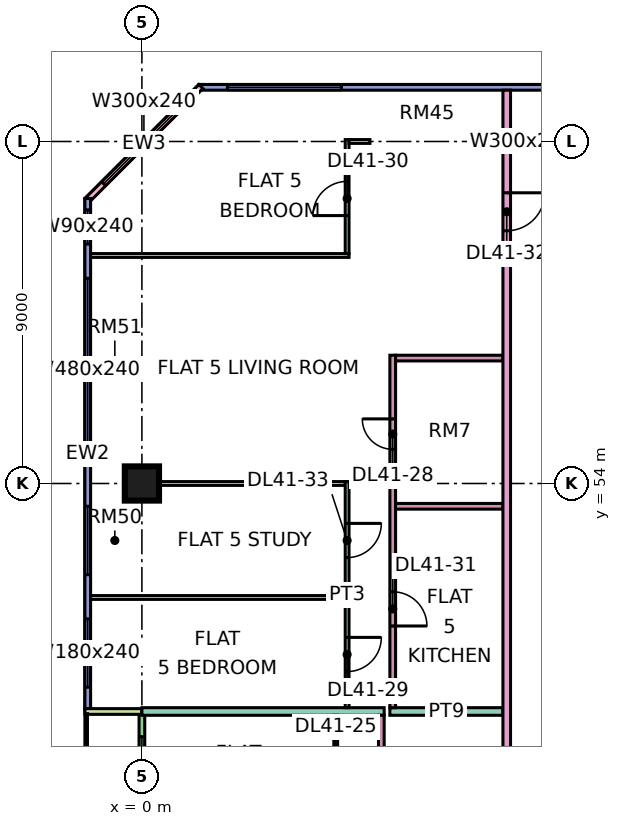
"""IFC4 building model, lengths in metres.
Left out: names, types, materials, properties, quantities, classifications, styles, units other than length and angle.
Written with IfcOpenShell. Run it as: python <this file> out.ifc"""

import sys

from ifc_helpers import new_model, si_unit, direction, frame, frame_2d, origin, origin_2d, place, context, subcontext, project, spatial, rectangle, extrude, element, fill, save


model = new_model("IFC4")
c1 = context("Model", 3, precision=1e-05, world=origin(), true_north=direction((0.0, 1.0)))
c2 = subcontext(c1, "Body", "Model", "MODEL_VIEW")
j1 = project(units=[si_unit("LENGTHUNIT", "METRE"), si_unit("PLANEANGLEUNIT", "RADIAN")], contexts=[c1])
p1 = place(None, origin())
s1 = spatial("IfcSite", under=j1, at=p1, CompositionType="ELEMENT")
p2 = place(p1, origin())
s2 = spatial("IfcBuilding", under=s1, at=p2, CompositionType="ELEMENT")
p3 = place(p2, frame((0.0, 0.0, 179.9)))
s3 = spatial("IfcBuildingStorey", under=s2, at=p3, CompositionType="ELEMENT", Elevation=179.9)
p4 = place(p3, frame((0.0, 54.0, 0.0), z_axis=(0.0, 0.0, 1.0), x_axis=(1.0, 0.0, 0.0)))
e1 = element("IfcColumn", 1, at=p4, inside=s3, PredefinedType="COLUMN", context=c2, shape_type="SweptSolid", body=[
    extrude(rectangle(XDim=0.9, YDim=0.9, at=origin_2d()), origin(), (0.0, 0.0, 1.0), 3.75),
])
p5 = place(p3, frame((11.925, 64.425, 0.0), z_axis=(0.0, 0.0, 1.0), x_axis=(-1.0, 0.0, 0.0)))
e2 = element("IfcWall", 2, at=p5, inside=s3, PredefinedType="SOLIDWALL", context=c2, shape_type="SweptSolid", body=[
    extrude(rectangle(XDim=10.425, YDim=0.15, at=frame_2d((5.212, 0.0))), origin(), (0.0, 0.0, 1.0), 3.35),
])
p6 = place(p5, frame((6.675, 0.0, 0.45)))
e3 = element("IfcOpeningElement", 3, at=p6, cuts=e2, PredefinedType="OPENING", context=c2, shape_type="SweptSolid", body=[
    extrude(rectangle(XDim=3.0, YDim=2.4, at=frame_2d((1.5, 1.2))), frame((0.0, 0.085, 0.0), z_axis=(0.0, -1.0, 0.0), x_axis=(1.0, 0.0, 0.0)), (0.0, 0.0, 1.0), 0.17),
])
p7 = place(p3, frame((1.553, 64.447, 0.0), z_axis=(0.0, 0.0, 1.0), x_axis=(-0.707106781187, -0.707106781187, 0.0)))
e4 = element("IfcWall", 4, at=p7, inside=s3, PredefinedType="SOLIDWALL", context=c2, shape_type="SweptSolid", body=[
    extrude(rectangle(XDim=4.243, YDim=0.15, at=frame_2d((2.121, 0.0))), origin(), (0.0, 0.0, 1.0), 3.35),
])
p8 = place(p7, frame((0.621, 0.0, 0.45)))
e5 = element("IfcOpeningElement", 5, at=p8, cuts=e4, PredefinedType="OPENING", context=c2, shape_type="SweptSolid", body=[
    extrude(rectangle(XDim=3.0, YDim=2.4, at=frame_2d((1.5, 1.2))), frame((0.0, 0.085, 0.0), z_axis=(0.0, -1.0, 0.0), x_axis=(1.0, 0.0, 0.0)), (0.0, 0.0, 1.0), 0.17),
])
p9 = place(p3, frame((-1.425, 61.5, 0.0), z_axis=(0.0, 0.0, 1.0), x_axis=(0.0, -1.0, 0.0)))
e6 = element("IfcWall", 6, at=p9, inside=s3, PredefinedType="SOLIDWALL", context=c2, shape_type="SweptSolid", body=[
    extrude(rectangle(XDim=13.425, YDim=0.15, at=frame_2d((6.712, 0.0))), origin(), (0.0, 0.0, 1.0), 3.35),
])
p10 = place(p9, frame((0.3, 0.0, 0.45)))
e7 = element("IfcOpeningElement", 7, at=p10, cuts=e6, PredefinedType="OPENING", context=c2, shape_type="SweptSolid", body=[
    extrude(rectangle(XDim=0.9, YDim=2.4, at=frame_2d((0.45, 1.2))), frame((0.0, 0.085, 0.0), z_axis=(0.0, -1.0, 0.0), x_axis=(1.0, 0.0, 0.0)), (0.0, 0.0, 1.0), 0.17),
])
p11 = place(p9, frame((2.1, 0.0, 0.45)))
e8 = element("IfcOpeningElement", 8, at=p11, cuts=e6, PredefinedType="OPENING", context=c2, shape_type="SweptSolid", body=[
    extrude(rectangle(XDim=4.8, YDim=2.4, at=frame_2d((2.4, 1.2))), frame((0.0, 0.085, 0.0), z_axis=(0.0, -1.0, 0.0), x_axis=(1.0, 0.0, 0.0)), (0.0, 0.0, 1.0), 0.17),
])
p12 = place(p9, frame((8.1, 0.0, 0.45)))
e9 = element("IfcOpeningElement", 9, at=p12, cuts=e6, PredefinedType="OPENING", context=c2, shape_type="SweptSolid", body=[
    extrude(rectangle(XDim=1.8, YDim=2.4, at=frame_2d((0.9, 1.2))), frame((0.0, 0.085, 0.0), z_axis=(0.0, -1.0, 0.0), x_axis=(1.0, 0.0, 0.0)), (0.0, 0.0, 1.0), 0.17),
])
p13 = place(p9, frame((11.062, 0.0, 0.45)))
e10 = element("IfcOpeningElement", 10, at=p13, cuts=e6, PredefinedType="OPENING", context=c2, shape_type="SweptSolid", body=[
    extrude(rectangle(XDim=1.8, YDim=2.4, at=frame_2d((0.9, 1.2))), frame((0.0, 0.085, 0.0), z_axis=(0.0, -1.0, 0.0), x_axis=(1.0, 0.0, 0.0)), (0.0, 0.0, 1.0), 0.17),
])
p14 = place(p3, frame((0.0, 47.925, 0.0), z_axis=(0.0, 0.0, 1.0), x_axis=(0.0, -1.0, 0.0)))
e11 = element("IfcWall", 11, at=p14, inside=s3, PredefinedType="SOLIDWALL", context=c2, shape_type="SweptSolid", body=[
    extrude(rectangle(XDim=11.85, YDim=0.15, at=frame_2d((5.925, 0.0))), origin(), (0.0, 0.0, 1.0), 3.35),
])
p15 = place(p14, frame((0.587, 0.0, 0.45)))
e12 = element("IfcOpeningElement", 12, at=p15, cuts=e11, PredefinedType="OPENING", context=c2, shape_type="SweptSolid", body=[
    extrude(rectangle(XDim=1.2, YDim=2.4, at=frame_2d((0.6, 1.2))), frame((0.0, 0.085, 0.0), z_axis=(0.0, -1.0, 0.0), x_axis=(1.0, 0.0, 0.0)), (0.0, 0.0, 1.0), 0.17),
])
p16 = place(p14, frame((5.3, 0.0, 0.0)))
e13 = element("IfcOpeningElement", 13, at=p16, cuts=e11, PredefinedType="OPENING", context=c2, shape_type="SweptSolid", body=[
    extrude(rectangle(XDim=1.8, YDim=2.4, at=frame_2d((0.9, 1.2))), frame((0.0, 0.085, 0.0), z_axis=(0.0, -1.0, 0.0), x_axis=(1.0, 0.0, 0.0)), (0.0, 0.0, 1.0), 0.17),
])
p17 = place(p14, frame((9.55, 0.0, 0.45)))
e14 = element("IfcOpeningElement", 14, at=p17, cuts=e11, PredefinedType="OPENING", context=c2, shape_type="SweptSolid", body=[
    extrude(rectangle(XDim=1.2, YDim=2.4, at=frame_2d((0.6, 1.2))), frame((0.0, 0.085, 0.0), z_axis=(0.0, -1.0, 0.0), x_axis=(1.0, 0.0, 0.0)), (0.0, 0.0, 1.0), 0.17),
])
p18 = place(p3, frame((-1.5, 48.0, 0.0), z_axis=(0.0, 0.0, 1.0), x_axis=(1.0, 0.0, 0.0)))
e15 = element("IfcWall", 15, at=p18, inside=s3, PredefinedType="SOLIDWALL", context=c2, shape_type="SweptSolid", body=[
    extrude(rectangle(XDim=1.5, YDim=0.15, at=frame_2d((0.75, 0.0))), origin(), (0.0, 0.0, 1.0), 3.35),
])
p19 = place(p3, frame((0.0, 48.0, 0.0), z_axis=(0.0, 0.0, 1.0), x_axis=(1.0, 0.0, 0.0)))
e16 = element("IfcWall", 16, at=p19, inside=s3, PredefinedType="PARTITIONING", context=c2, shape_type="SweptSolid", body=[
    extrude(rectangle(XDim=6.375, YDim=0.2, at=frame_2d((3.188, 0.0))), origin(), (0.0, 0.0, 1.0), 3.35),
])
p20 = place(p3, frame((-1.35, 51.0, 0.0), z_axis=(0.0, 0.0, 1.0), x_axis=(1.0, 0.0, 0.0)))
e17 = element("IfcWall", 17, at=p20, inside=s3, PredefinedType="PARTITIONING", context=c2, shape_type="SweptSolid", body=[
    extrude(rectangle(XDim=6.7, YDim=0.1, at=frame_2d((3.35, 0.0))), origin(), (0.0, 0.0, 1.0), 3.35),
])
e18 = element("IfcWall", 18, at=p4, inside=s3, PredefinedType="PARTITIONING", context=c2, shape_type="SweptSolid", body=[
    extrude(rectangle(XDim=5.35, YDim=0.1, at=frame_2d((2.675, 0.0))), origin(), (0.0, 0.0, 1.0), 3.35),
])
p21 = place(p3, frame((-1.35, 60.0, 0.0), z_axis=(0.0, 0.0, 1.0), x_axis=(1.0, 0.0, 0.0)))
e19 = element("IfcWall", 19, at=p21, inside=s3, PredefinedType="PARTITIONING", context=c2, shape_type="SweptSolid", body=[
    extrude(rectangle(XDim=6.8, YDim=0.1, at=frame_2d((3.4, 0.0))), origin(), (0.0, 0.0, 1.0), 3.35),
])
p22 = place(p3, frame((5.1, 45.05, 0.0), z_axis=(0.0, 0.0, 1.0), x_axis=(0.0, 1.0, 0.0)))
e20 = element("IfcWall", 20, at=p22, inside=s3, PredefinedType="PARTITIONING", context=c2, shape_type="SweptSolid", body=[
    extrude(rectangle(XDim=2.85, YDim=0.1, at=frame_2d((1.425, 0.0))), origin(), (0.0, 0.0, 1.0), 3.35),
])
p23 = place(p22, frame((1.0, 0.0, 0.0)))
e21 = element("IfcOpeningElement", 21, at=p23, cuts=e20, PredefinedType="OPENING", context=c2, shape_type="SweptSolid", body=[
    extrude(rectangle(XDim=0.9, YDim=2.1, at=frame_2d((0.45, 1.05))), frame((0.0, 0.06, 0.0), z_axis=(0.0, -1.0, 0.0), x_axis=(1.0, 0.0, 0.0)), (0.0, 0.0, 1.0), 0.12),
])
p24 = place(p3, frame((5.4, 48.1, 0.0), z_axis=(0.0, 0.0, 1.0), x_axis=(0.0, 1.0, 0.0)))
e22 = element("IfcWall", 22, at=p24, inside=s3, PredefinedType="PARTITIONING", context=c2, shape_type="SweptSolid", body=[
    extrude(rectangle(XDim=5.95, YDim=0.1, at=frame_2d((2.975, 0.0))), origin(), (0.0, 0.0, 1.0), 3.35),
])
p25 = place(p24, frame((0.95, 0.0, 0.0)))
e23 = element("IfcOpeningElement", 23, at=p25, cuts=e22, PredefinedType="OPENING", context=c2, shape_type="SweptSolid", body=[
    extrude(rectangle(XDim=0.9, YDim=2.1, at=frame_2d((0.45, 1.05))), frame((0.0, 0.06, 0.0), z_axis=(0.0, -1.0, 0.0), x_axis=(1.0, 0.0, 0.0)), (0.0, 0.0, 1.0), 0.12),
])
p26 = place(p24, frame((3.95, 0.0, 0.0)))
e24 = element("IfcOpeningElement", 24, at=p26, cuts=e22, PredefinedType="OPENING", context=c2, shape_type="SweptSolid", body=[
    extrude(rectangle(XDim=0.9, YDim=2.1, at=frame_2d((0.45, 1.05))), frame((0.0, 0.06, 0.0), z_axis=(0.0, -1.0, 0.0), x_axis=(1.0, 0.0, 0.0)), (0.0, 0.0, 1.0), 0.12),
])
p27 = place(p3, frame((5.4, 60.05, 0.0), z_axis=(0.0, 0.0, 1.0), x_axis=(0.0, 1.0, 0.0)))
e25 = element("IfcWall", 25, at=p27, inside=s3, PredefinedType="PARTITIONING", context=c2, shape_type="SweptSolid", body=[
    extrude(rectangle(XDim=3.0, YDim=0.1, at=frame_2d((1.5, 0.0))), origin(), (0.0, 0.0, 1.0), 3.35),
])
p28 = place(p27, frame((1.0, 0.0, 0.0)))
e26 = element("IfcOpeningElement", 26, at=p28, cuts=e25, PredefinedType="OPENING", context=c2, shape_type="SweptSolid", body=[
    extrude(rectangle(XDim=0.9, YDim=2.1, at=frame_2d((0.45, 1.05))), frame((0.0, 0.06, 0.0), z_axis=(0.0, -1.0, 0.0), x_axis=(1.0, 0.0, 0.0)), (0.0, 0.0, 1.0), 0.12),
])
p29 = place(p3, frame((5.45, 63.0, 0.0), z_axis=(0.0, 0.0, 1.0), x_axis=(1.0, 0.0, 0.0)))
e27 = element("IfcWall", 27, at=p29, inside=s3, PredefinedType="PARTITIONING", context=c2, shape_type="SweptSolid", body=[
    extrude(rectangle(XDim=0.55, YDim=0.1, at=frame_2d((0.275, 0.0))), origin(), (0.0, 0.0, 1.0), 3.35),
])
p30 = place(p3, frame((6.3, 38.625, 0.0), z_axis=(0.0, 0.0, 1.0), x_axis=(0.0, 1.0, 0.0)))
e28 = element("IfcWall", 28, at=p30, inside=s3, PredefinedType="PARTITIONING", context=c2, shape_type="SweptSolid", body=[
    extrude(rectangle(XDim=9.275, YDim=0.15, at=frame_2d((4.637, 0.0))), origin(), (0.0, 0.0, 1.0), 3.35),
])
p31 = place(p30, frame((1.125, 0.0, 0.0)))
e29 = element("IfcOpeningElement", 29, at=p31, cuts=e28, PredefinedType="OPENING", context=c2, shape_type="SweptSolid", body=[
    extrude(rectangle(XDim=0.8, YDim=2.1, at=frame_2d((0.4, 1.05))), frame((0.0, 0.085, 0.0), z_axis=(0.0, -1.0, 0.0), x_axis=(1.0, 0.0, 0.0)), (0.0, 0.0, 1.0), 0.17),
])
p32 = place(p30, frame((5.775, 0.0, 0.0)))
e30 = element("IfcOpeningElement", 30, at=p32, cuts=e28, PredefinedType="OPENING", context=c2, shape_type="SweptSolid", body=[
    extrude(rectangle(XDim=0.9, YDim=2.1, at=frame_2d((0.45, 1.05))), frame((0.0, 0.085, 0.0), z_axis=(0.0, -1.0, 0.0), x_axis=(1.0, 0.0, 0.0)), (0.0, 0.0, 1.0), 0.17),
])
p33 = place(p3, frame((6.525, 48.0, 0.0), z_axis=(0.0, 0.0, 1.0), x_axis=(1.0, 0.0, 0.0)))
e31 = element("IfcWall", 31, at=p33, inside=s3, PredefinedType="PARTITIONING", context=c2, shape_type="SweptSolid", body=[
    extrude(rectangle(XDim=2.975, YDim=0.2, at=frame_2d((1.488, 0.0))), origin(), (0.0, 0.0, 1.0), 3.35),
])
p34 = place(p3, frame((6.6, 48.1, 0.0), z_axis=(0.0, 0.0, 1.0), x_axis=(0.0, 1.0, 0.0)))
e32 = element("IfcWall", 32, at=p34, inside=s3, PredefinedType="PARTITIONING", context=c2, shape_type="SweptSolid", body=[
    extrude(rectangle(XDim=9.275, YDim=0.15, at=frame_2d((4.637, 0.0))), origin(), (0.0, 0.0, 1.0), 3.35),
])
p35 = place(p34, frame((6.8, 0.0, 0.0)))
e33 = element("IfcOpeningElement", 33, at=p35, cuts=e32, PredefinedType="OPENING", context=c2, shape_type="SweptSolid", body=[
    extrude(rectangle(XDim=0.8, YDim=2.1, at=frame_2d((0.4, 1.05))), frame((0.0, 0.085, 0.0), z_axis=(0.0, -1.0, 0.0), x_axis=(1.0, 0.0, 0.0)), (0.0, 0.0, 1.0), 0.17),
])
p36 = place(p34, frame((2.15, 0.0, 0.0)))
e34 = element("IfcOpeningElement", 34, at=p36, cuts=e32, PredefinedType="OPENING", context=c2, shape_type="SweptSolid", body=[
    extrude(rectangle(XDim=0.9, YDim=2.1, at=frame_2d((0.45, 1.05))), frame((0.0, 0.085, 0.0), z_axis=(0.0, -1.0, 0.0), x_axis=(1.0, 0.0, 0.0)), (0.0, 0.0, 1.0), 0.17),
])
for number, where, z_axis, x_axis in (
    (35, (6.675, 53.4, 0.0), (0.0, 0.0, 1.0), (1.0, 0.0, 0.0)),
    (36, (6.675, 57.3, 0.0), (0.0, 0.0, 1.0), (1.0, 0.0, 0.0)),
):
    element("IfcWall", number, at=place(p3, frame(where, z_axis=z_axis, x_axis=x_axis)), inside=s3, PredefinedType="PARTITIONING", context=c2, shape_type="SweptSolid", body=[
        extrude(rectangle(XDim=2.825, YDim=0.15, at=frame_2d((1.413, 0.0))), origin(), (0.0, 0.0, 1.0), 3.35),
    ])
p37 = place(p3, frame((9.6, 20.0, 0.0), z_axis=(0.0, 0.0, 1.0), x_axis=(0.0, 1.0, 0.0)))
e37 = element("IfcWall", 37, at=p37, inside=s3, PredefinedType="PARTITIONING", context=c2, shape_type="SweptSolid", body=[
    extrude(rectangle(XDim=44.35, YDim=0.2, at=frame_2d((22.175, 0.0))), origin(), (0.0, 0.0, 1.0), 3.35),
])
p38 = place(p37, frame((16.8, 0.0, 0.0)))
e38 = element("IfcOpeningElement", 38, at=p38, cuts=e37, PredefinedType="OPENING", context=c2, shape_type="SweptSolid", body=[
    extrude(rectangle(XDim=1.0, YDim=2.1, at=frame_2d((0.5, 1.05))), frame((0.0, 0.11, 0.0), z_axis=(0.0, -1.0, 0.0), x_axis=(1.0, 0.0, 0.0)), (0.0, 0.0, 1.0), 0.22),
])
p39 = place(p37, frame((40.65, 0.0, 0.0)))
e39 = element("IfcOpeningElement", 39, at=p39, cuts=e37, PredefinedType="OPENING", context=c2, shape_type="SweptSolid", body=[
    extrude(rectangle(XDim=1.0, YDim=2.1, at=frame_2d((0.5, 1.05))), frame((0.0, 0.11, 0.0), z_axis=(0.0, -1.0, 0.0), x_axis=(1.0, 0.0, 0.0)), (0.0, 0.0, 1.0), 0.22),
])
p40 = place(p37, frame((0.6, 0.0, 0.0)))
e40 = element("IfcOpeningElement", 40, at=p40, cuts=e37, PredefinedType="OPENING", context=c2, shape_type="SweptSolid", body=[
    extrude(rectangle(XDim=1.2, YDim=2.1, at=frame_2d((0.6, 1.05))), frame((0.0, 0.11, 0.0), z_axis=(0.0, -1.0, 0.0), x_axis=(1.0, 0.0, 0.0)), (0.0, 0.0, 1.0), 0.22),
])
p41 = place(p37, frame((4.2, 0.0, 0.0)))
e41 = element("IfcOpeningElement", 41, at=p41, cuts=e37, PredefinedType="OPENING", context=c2, shape_type="SweptSolid", body=[
    extrude(rectangle(XDim=1.0, YDim=2.1, at=frame_2d((0.5, 1.05))), frame((0.0, 0.11, 0.0), z_axis=(0.0, -1.0, 0.0), x_axis=(1.0, 0.0, 0.0)), (0.0, 0.0, 1.0), 0.22),
])
p42 = place(p6, origin())
e42 = element("IfcWindow", 42, at=p42, inside=s3, PartitioningType="SINGLE_PANEL", PredefinedType="WINDOW", context=c2, shape_type="SweptSolid", body=[
    extrude(rectangle(XDim=3.0, YDim=2.4, at=frame_2d((1.5, 1.2))), frame((0.0, 0.03, 0.0), z_axis=(0.0, -1.0, 0.0), x_axis=(1.0, 0.0, 0.0)), (0.0, 0.0, 1.0), 0.06),
])
fill(e3, e42)
p43 = place(p8, origin())
e43 = element("IfcWindow", 43, at=p43, inside=s3, PartitioningType="SINGLE_PANEL", PredefinedType="WINDOW", context=c2, shape_type="SweptSolid", body=[
    extrude(rectangle(XDim=3.0, YDim=2.4, at=frame_2d((1.5, 1.2))), frame((0.0, 0.03, 0.0), z_axis=(0.0, -1.0, 0.0), x_axis=(1.0, 0.0, 0.0)), (0.0, 0.0, 1.0), 0.06),
])
fill(e5, e43)
p44 = place(p10, origin())
e44 = element("IfcWindow", 44, at=p44, inside=s3, PartitioningType="SINGLE_PANEL", PredefinedType="WINDOW", context=c2, shape_type="SweptSolid", body=[
    extrude(rectangle(XDim=0.9, YDim=2.4, at=frame_2d((0.45, 1.2))), frame((0.0, 0.03, 0.0), z_axis=(0.0, -1.0, 0.0), x_axis=(1.0, 0.0, 0.0)), (0.0, 0.0, 1.0), 0.06),
])
fill(e7, e44)
p45 = place(p11, origin())
e45 = element("IfcWindow", 45, at=p45, inside=s3, PartitioningType="SINGLE_PANEL", PredefinedType="WINDOW", context=c2, shape_type="SweptSolid", body=[
    extrude(rectangle(XDim=4.8, YDim=2.4, at=frame_2d((2.4, 1.2))), frame((0.0, 0.03, 0.0), z_axis=(0.0, -1.0, 0.0), x_axis=(1.0, 0.0, 0.0)), (0.0, 0.0, 1.0), 0.06),
])
fill(e8, e45)
p46 = place(p12, origin())
e46 = element("IfcWindow", 46, at=p46, inside=s3, PartitioningType="SINGLE_PANEL", PredefinedType="WINDOW", context=c2, shape_type="SweptSolid", body=[
    extrude(rectangle(XDim=1.8, YDim=2.4, at=frame_2d((0.9, 1.2))), frame((0.0, 0.03, 0.0), z_axis=(0.0, -1.0, 0.0), x_axis=(1.0, 0.0, 0.0)), (0.0, 0.0, 1.0), 0.06),
])
fill(e9, e46)
p47 = place(p13, origin())
e47 = element("IfcWindow", 47, at=p47, inside=s3, PartitioningType="SINGLE_PANEL", PredefinedType="WINDOW", context=c2, shape_type="SweptSolid", body=[
    extrude(rectangle(XDim=1.8, YDim=2.4, at=frame_2d((0.9, 1.2))), frame((0.0, 0.03, 0.0), z_axis=(0.0, -1.0, 0.0), x_axis=(1.0, 0.0, 0.0)), (0.0, 0.0, 1.0), 0.06),
])
fill(e10, e47)
p48 = place(p15, origin())
e48 = element("IfcWindow", 48, at=p48, inside=s3, PartitioningType="SINGLE_PANEL", PredefinedType="WINDOW", context=c2, shape_type="SweptSolid", body=[
    extrude(rectangle(XDim=1.2, YDim=2.4, at=frame_2d((0.6, 1.2))), frame((0.0, 0.03, 0.0), z_axis=(0.0, -1.0, 0.0), x_axis=(1.0, 0.0, 0.0)), (0.0, 0.0, 1.0), 0.06),
])
fill(e12, e48)
p49 = place(p35, frame((0.8, 0.0, 0.0), z_axis=(0.0, 0.0, 1.0), x_axis=(-1.0, 0.0, 0.0)))
e49 = element("IfcDoor", 49, at=p49, inside=s3, OperationType="SINGLE_SWING_RIGHT", PredefinedType="DOOR", context=c2, shape_type="SweptSolid", body=[
    extrude(rectangle(XDim=0.8, YDim=2.1, at=frame_2d((0.4, 1.05))), frame((0.0, 0.025, 0.0), z_axis=(0.0, -1.0, 0.0), x_axis=(1.0, 0.0, 0.0)), (0.0, 0.0, 1.0), 0.05),
])
fill(e33, e49)
p50 = place(p25, origin())
e50 = element("IfcDoor", 50, at=p50, inside=s3, OperationType="SINGLE_SWING_RIGHT", PredefinedType="DOOR", context=c2, shape_type="SweptSolid", body=[
    extrude(rectangle(XDim=0.9, YDim=2.1, at=frame_2d((0.45, 1.05))), frame((0.0, 0.025, 0.0), z_axis=(0.0, -1.0, 0.0), x_axis=(1.0, 0.0, 0.0)), (0.0, 0.0, 1.0), 0.05),
])
fill(e23, e50)
p51 = place(p28, origin())
e51 = element("IfcDoor", 51, at=p51, inside=s3, OperationType="SINGLE_SWING_LEFT", PredefinedType="DOOR", context=c2, shape_type="SweptSolid", body=[
    extrude(rectangle(XDim=0.9, YDim=2.1, at=frame_2d((0.45, 1.05))), frame((0.0, 0.025, 0.0), z_axis=(0.0, -1.0, 0.0), x_axis=(1.0, 0.0, 0.0)), (0.0, 0.0, 1.0), 0.05),
])
fill(e26, e51)
p52 = place(p36, frame((0.9, 0.0, 0.0), z_axis=(0.0, 0.0, 1.0), x_axis=(-1.0, 0.0, 0.0)))
e52 = element("IfcDoor", 52, at=p52, inside=s3, OperationType="SINGLE_SWING_LEFT", PredefinedType="DOOR", context=c2, shape_type="SweptSolid", body=[
    extrude(rectangle(XDim=0.9, YDim=2.1, at=frame_2d((0.45, 1.05))), frame((0.0, 0.025, 0.0), z_axis=(0.0, -1.0, 0.0), x_axis=(1.0, 0.0, 0.0)), (0.0, 0.0, 1.0), 0.05),
])
fill(e34, e52)
p53 = place(p39, origin())
e53 = element("IfcDoor", 53, at=p53, inside=s3, OperationType="SINGLE_SWING_RIGHT", PredefinedType="DOOR", context=c2, shape_type="SweptSolid", body=[
    extrude(rectangle(XDim=1.0, YDim=2.1, at=frame_2d((0.5, 1.05))), frame((0.0, 0.025, 0.0), z_axis=(0.0, -1.0, 0.0), x_axis=(1.0, 0.0, 0.0)), (0.0, 0.0, 1.0), 0.05),
])
fill(e39, e53)
p54 = place(p26, origin())
e54 = element("IfcDoor", 54, at=p54, inside=s3, OperationType="SINGLE_SWING_RIGHT", PredefinedType="DOOR", context=c2, shape_type="SweptSolid", body=[
    extrude(rectangle(XDim=0.9, YDim=2.1, at=frame_2d((0.45, 1.05))), frame((0.0, 0.025, 0.0), z_axis=(0.0, -1.0, 0.0), x_axis=(1.0, 0.0, 0.0)), (0.0, 0.0, 1.0), 0.05),
])
fill(e24, e54)
save(model, sys.argv[1])
